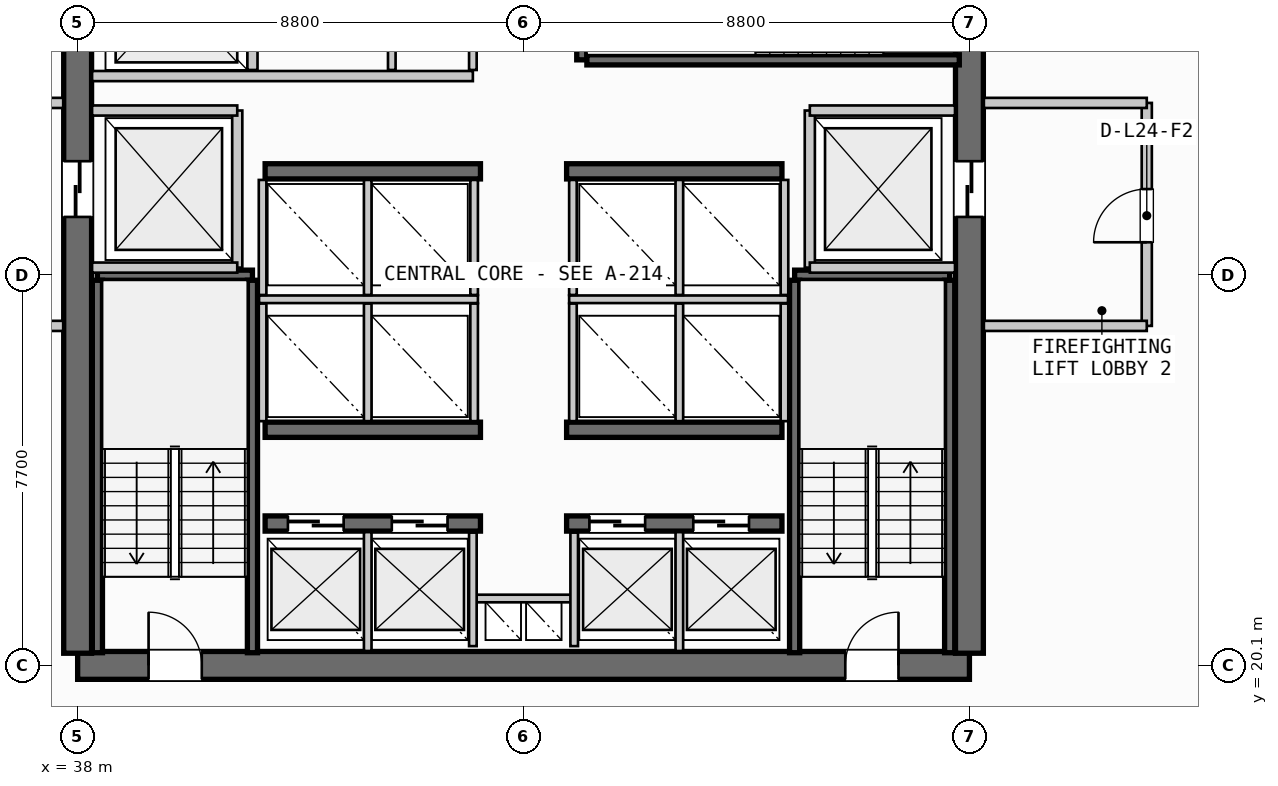
"""IFC4 building model, lengths in metres.
Left out: names, types, materials, properties, quantities, classifications, styles, units other than length and angle.
Written with IfcOpenShell. Run it as: python <this file> out.ifc"""

import sys

from ifc_helpers import new_model, si_unit, direction, frame, frame_2d, origin, place, context, subcontext, project, spatial, rectangle, extrude, source, transform, mapped, element, fill, save


model = new_model("IFC4")
c1 = context("Model", 3, precision=1e-05, world=origin(), true_north=direction((0.0, 1.0)))
c2 = subcontext(c1, "Body", "Model", "MODEL_VIEW")
j1 = project(units=[si_unit("LENGTHUNIT", "METRE"), si_unit("PLANEANGLEUNIT", "RADIAN")], contexts=[c1])
p1 = place(None, origin())
s1 = spatial("IfcSite", under=j1, at=p1, CompositionType="ELEMENT")
p2 = place(p1, origin())
s2 = spatial("IfcBuilding", under=s1, at=p2, CompositionType="ELEMENT")
p3 = place(p2, frame((0.0, 0.0, 100.0)))
s3 = spatial("IfcBuildingStorey", under=s2, at=p3, CompositionType="ELEMENT", Elevation=100.0)
p4 = place(p3, frame((38.0, 20.1, 0.0), z_axis=(0.0, 0.0, 1.0), x_axis=(1.0, 0.0, 0.0)))
e1 = element("IfcWall", 1, at=p4, inside=s3, PredefinedType="SHEAR", context=c2, shape_type="SweptSolid", body=[
    extrude(rectangle(XDim=17.6, YDim=0.55, at=frame_2d((8.8, 0.0))), origin(), (0.0, 0.0, 1.0), 3.35),
])
p5 = place(p4, frame((1.4, 0.0, 0.0)))
e2 = element("IfcOpeningElement", 2, at=p5, cuts=e1, PredefinedType="OPENING", context=c2, shape_type="SweptSolid", body=[
    extrude(rectangle(XDim=1.05, YDim=2.15, at=frame_2d((0.525, 1.075))), frame((0.0, 0.285, 0.0), z_axis=(0.0, -1.0, 0.0), x_axis=(1.0, 0.0, 0.0)), (0.0, 0.0, 1.0), 0.57),
])
p6 = place(p4, frame((15.15, 0.0, 0.0)))
e3 = element("IfcOpeningElement", 3, at=p6, cuts=e1, PredefinedType="OPENING", context=c2, shape_type="SweptSolid", body=[
    extrude(rectangle(XDim=1.05, YDim=2.15, at=frame_2d((0.525, 1.075))), frame((0.0, 0.285, 0.0), z_axis=(0.0, -1.0, 0.0), x_axis=(1.0, 0.0, 0.0)), (0.0, 0.0, 1.0), 0.57),
])
p7 = place(p3, frame((38.0, 35.26, 0.0), z_axis=(0.0, 0.0, 1.0), x_axis=(0.0, -1.0, 0.0)))
e4 = element("IfcWall", 4, at=p7, inside=s3, PredefinedType="SHEAR", context=c2, shape_type="SweptSolid", body=[
    extrude(rectangle(XDim=14.92, YDim=0.55, at=frame_2d((7.46, 0.0))), origin(), (0.0, 0.0, 1.0), 3.35),
])
p8 = place(p7, frame((5.21, 0.0, 0.0)))
e5 = element("IfcOpeningElement", 5, at=p8, cuts=e4, PredefinedType="OPENING", context=c2, shape_type="SweptSolid", body=[
    extrude(rectangle(XDim=1.1, YDim=2.2, at=frame_2d((0.55, 1.1))), frame((0.0, 0.285, 0.0), z_axis=(0.0, -1.0, 0.0), x_axis=(1.0, 0.0, 0.0)), (0.0, 0.0, 1.0), 0.57),
])
p9 = place(p3, frame((55.6, 20.34, 0.0), z_axis=(0.0, 0.0, 1.0), x_axis=(0.0, 1.0, 0.0)))
e6 = element("IfcWall", 6, at=p9, inside=s3, PredefinedType="SHEAR", context=c2, shape_type="SweptSolid", body=[
    extrude(rectangle(XDim=14.92, YDim=0.55, at=frame_2d((7.46, 0.0))), origin(), (0.0, 0.0, 1.0), 3.35),
])
p10 = place(p9, frame((12.71, 0.0, 0.0)))
e7 = element("IfcOpeningElement", 7, at=p10, cuts=e6, PredefinedType="OPENING", context=c2, shape_type="SweptSolid", body=[
    extrude(rectangle(XDim=1.05, YDim=2.15, at=frame_2d((0.525, 1.075))), frame((0.0, 0.285, 0.0), z_axis=(0.0, -1.0, 0.0), x_axis=(1.0, 0.0, 0.0)), (0.0, 0.0, 1.0), 0.57),
])
p11 = place(p9, frame((8.61, 0.0, 0.0)))
e8 = element("IfcOpeningElement", 8, at=p11, cuts=e6, PredefinedType="OPENING", context=c2, shape_type="SweptSolid", body=[
    extrude(rectangle(XDim=1.1, YDim=2.2, at=frame_2d((0.55, 1.1))), frame((0.0, 0.285, 0.0), z_axis=(0.0, -1.0, 0.0), x_axis=(1.0, 0.0, 0.0)), (0.0, 0.0, 1.0), 0.57),
])
p12 = place(p3, frame((41.7, 22.9, 0.0), z_axis=(0.0, 0.0, 1.0), x_axis=(1.0, 0.0, 0.0)))
e9 = element("IfcWall", 9, at=p12, inside=s3, PredefinedType="SHEAR", context=c2, shape_type="SweptSolid", body=[
    extrude(rectangle(XDim=4.25, YDim=0.3, at=frame_2d((2.125, 0.0))), origin(), (0.0, 0.0, 1.0), 3.35),
])
p13 = place(p12, frame((0.45, 0.0, 0.0)))
e10 = element("IfcOpeningElement", 10, at=p13, cuts=e9, PredefinedType="OPENING", context=c2, shape_type="SweptSolid", body=[
    extrude(rectangle(XDim=1.1, YDim=2.2, at=frame_2d((0.55, 1.1))), frame((0.0, 0.16, 0.0), z_axis=(0.0, -1.0, 0.0), x_axis=(1.0, 0.0, 0.0)), (0.0, 0.0, 1.0), 0.32),
])
p14 = place(p12, frame((2.5, 0.0, 0.0)))
e11 = element("IfcOpeningElement", 11, at=p14, cuts=e9, PredefinedType="OPENING", context=c2, shape_type="SweptSolid", body=[
    extrude(rectangle(XDim=1.1, YDim=2.2, at=frame_2d((0.55, 1.1))), frame((0.0, 0.16, 0.0), z_axis=(0.0, -1.0, 0.0), x_axis=(1.0, 0.0, 0.0)), (0.0, 0.0, 1.0), 0.32),
])
p15 = place(p3, frame((47.65, 22.9, 0.0), z_axis=(0.0, 0.0, 1.0), x_axis=(1.0, 0.0, 0.0)))
e12 = element("IfcWall", 12, at=p15, inside=s3, PredefinedType="SHEAR", context=c2, shape_type="SweptSolid", body=[
    extrude(rectangle(XDim=4.25, YDim=0.3, at=frame_2d((2.125, 0.0))), origin(), (0.0, 0.0, 1.0), 3.35),
])
p16 = place(p15, frame((0.45, 0.0, 0.0)))
e13 = element("IfcOpeningElement", 13, at=p16, cuts=e12, PredefinedType="OPENING", context=c2, shape_type="SweptSolid", body=[
    extrude(rectangle(XDim=1.1, YDim=2.2, at=frame_2d((0.55, 1.1))), frame((0.0, 0.16, 0.0), z_axis=(0.0, -1.0, 0.0), x_axis=(1.0, 0.0, 0.0)), (0.0, 0.0, 1.0), 0.32),
])
p17 = place(p15, frame((2.5, 0.0, 0.0)))
e14 = element("IfcOpeningElement", 14, at=p17, cuts=e12, PredefinedType="OPENING", context=c2, shape_type="SweptSolid", body=[
    extrude(rectangle(XDim=1.1, YDim=2.2, at=frame_2d((0.55, 1.1))), frame((0.0, 0.16, 0.0), z_axis=(0.0, -1.0, 0.0), x_axis=(1.0, 0.0, 0.0)), (0.0, 0.0, 1.0), 0.32),
])
for number, where, z_axis, x_axis in (
    (15, (41.7, 24.75, 0.0), (0.0, 0.0, 1.0), (1.0, 0.0, 0.0)),
    (16, (47.65, 24.75, 0.0), (0.0, 0.0, 1.0), (1.0, 0.0, 0.0)),
    (17, (41.7, 29.85, 0.0), (0.0, 0.0, 1.0), (1.0, 0.0, 0.0)),
    (18, (47.65, 29.85, 0.0), (0.0, 0.0, 1.0), (1.0, 0.0, 0.0)),
):
    element("IfcWall", number, at=place(p3, frame(where, z_axis=z_axis, x_axis=x_axis)), inside=s3, PredefinedType="SHEAR", context=c2, shape_type="SweptSolid", body=[
        extrude(rectangle(XDim=4.25, YDim=0.3, at=frame_2d((2.125, 0.0))), origin(), (0.0, 0.0, 1.0), 3.35),
    ])
p18 = place(p3, frame((38.39, 27.8, 0.0), z_axis=(0.0, 0.0, 1.0), x_axis=(1.0, 0.0, 0.0)))
e19 = element("IfcWall", 19, at=p18, inside=s3, PredefinedType="SHEAR", context=c2, shape_type="SweptSolid", body=[
    extrude(rectangle(XDim=3.06, YDim=0.2, at=frame_2d((1.53, 0.0))), origin(), (0.0, 0.0, 1.0), 3.35),
])
for number, where, z_axis, x_axis in (
    (20, (41.45, 27.7, 0.0), (0.0, 0.0, 1.0), (0.0, -1.0, 0.0)),
    (21, (38.39, 20.35, 0.0), (0.0, 0.0, 1.0), (0.0, 1.0, 0.0)),
):
    element("IfcWall", number, at=place(p3, frame(where, z_axis=z_axis, x_axis=x_axis)), inside=s3, PredefinedType="SHEAR", context=c2, shape_type="SweptSolid", body=[
        extrude(rectangle(XDim=7.35, YDim=0.2, at=frame_2d((3.675, 0.0))), origin(), (0.0, 0.0, 1.0), 3.35),
    ])
p19 = place(p3, frame((52.15, 27.8, 0.0), z_axis=(0.0, 0.0, 1.0), x_axis=(1.0, 0.0, 0.0)))
e22 = element("IfcWall", 22, at=p19, inside=s3, PredefinedType="SHEAR", context=c2, shape_type="SweptSolid", body=[
    extrude(rectangle(XDim=3.06, YDim=0.2, at=frame_2d((1.53, 0.0))), origin(), (0.0, 0.0, 1.0), 3.35),
])
for number, where, z_axis, x_axis in (
    (23, (55.21, 27.7, 0.0), (0.0, 0.0, 1.0), (0.0, -1.0, 0.0)),
    (24, (52.15, 20.35, 0.0), (0.0, 0.0, 1.0), (0.0, 1.0, 0.0)),
):
    element("IfcWall", number, at=place(p3, frame(where, z_axis=z_axis, x_axis=x_axis)), inside=s3, PredefinedType="SHEAR", context=c2, shape_type="SweptSolid", body=[
        extrude(rectangle(XDim=7.35, YDim=0.2, at=frame_2d((3.675, 0.0))), origin(), (0.0, 0.0, 1.0), 3.35),
    ])
p20 = place(p3, frame((47.95, 32.05, 0.0), z_axis=(0.0, 0.0, 1.0), x_axis=(0.0, 1.0, 0.0)))
e25 = element("IfcWall", 25, at=p20, inside=s3, PredefinedType="SHEAR", context=c2, shape_type="SweptSolid", body=[
    extrude(rectangle(XDim=3.06, YDim=0.2, at=frame_2d((1.53, 0.0))), origin(), (0.0, 0.0, 1.0), 3.35),
])
p21 = place(p3, frame((55.4, 32.05, 0.0), z_axis=(0.0, 0.0, 1.0), x_axis=(-1.0, 0.0, 0.0)))
e26 = element("IfcWall", 26, at=p21, inside=s3, PredefinedType="SHEAR", context=c2, shape_type="SweptSolid", body=[
    extrude(rectangle(XDim=7.35, YDim=0.2, at=frame_2d((3.675, 0.0))), origin(), (0.0, 0.0, 1.0), 3.35),
])
p22 = place(p3, frame((45.8, 21.42, 0.0), z_axis=(0.0, 0.0, 1.0), x_axis=(1.0, 0.0, 0.0)))
e27 = element("IfcWall", 27, at=p22, inside=s3, PredefinedType="PARTITIONING", context=c2, shape_type="SweptSolid", body=[
    extrude(rectangle(XDim=2.0, YDim=0.15, at=frame_2d((1.0, 0.0))), origin(), (0.0, 0.0, 1.0), 2.28),
])
for number, where, z_axis, x_axis in (
    (28, (45.8, 20.48, 0.0), (0.0, 0.0, 1.0), (0.0, 1.0, 0.0)),
    (29, (47.8, 20.48, 0.0), (0.0, 0.0, 1.0), (0.0, 1.0, 0.0)),
):
    element("IfcWall", number, at=place(p3, frame(where, z_axis=z_axis, x_axis=x_axis)), inside=s3, PredefinedType="PARTITIONING", context=c2, shape_type="SweptSolid", body=[
        extrude(rectangle(XDim=2.24, YDim=0.15, at=frame_2d((1.12, 0.0))), origin(), (0.0, 0.0, 1.0), 2.28),
    ])
p23 = place(p3, frame((41.15, 27.95, 0.0), z_axis=(0.0, 0.0, 1.0), x_axis=(0.0, 1.0, 0.0)))
e30 = element("IfcWall", 30, at=p23, inside=s3, PredefinedType="PARTITIONING", context=c2, shape_type="SweptSolid", body=[
    extrude(rectangle(XDim=3.1, YDim=0.2, at=frame_2d((1.55, 0.0))), origin(), (0.0, 0.0, 1.0), 2.28),
])
for number, where, z_axis, x_axis in (
    (31, (38.285, 27.95, 0.0), (0.0, 0.0, 1.0), (1.0, 0.0, 0.0)),
    (32, (38.285, 31.05, 0.0), (0.0, 0.0, 1.0), (1.0, 0.0, 0.0)),
):
    element("IfcWall", number, at=place(p3, frame(where, z_axis=z_axis, x_axis=x_axis)), inside=s3, PredefinedType="PARTITIONING", context=c2, shape_type="SweptSolid", body=[
        extrude(rectangle(XDim=2.865, YDim=0.2, at=frame_2d((1.433, 0.0))), origin(), (0.0, 0.0, 1.0), 2.28),
    ])
for number, where, z_axis, x_axis in (
    (33, (34.5, 26.8, 0.0), (0.0, 0.0, 1.0), (1.0, 0.0, 0.0)),
    (34, (34.5, 31.2, 0.0), (0.0, 0.0, 1.0), (1.0, 0.0, 0.0)),
):
    element("IfcWall", number, at=place(p3, frame(where, z_axis=z_axis, x_axis=x_axis)), inside=s3, PredefinedType="PARTITIONING", context=c2, shape_type="SweptSolid", body=[
        extrude(rectangle(XDim=3.215, YDim=0.2, at=frame_2d((1.607, 0.0))), origin(), (0.0, 0.0, 1.0), 2.28),
    ])
p24 = place(p3, frame((52.45, 27.95, 0.0), z_axis=(0.0, 0.0, 1.0), x_axis=(0.0, 1.0, 0.0)))
e35 = element("IfcWall", 35, at=p24, inside=s3, PredefinedType="PARTITIONING", context=c2, shape_type="SweptSolid", body=[
    extrude(rectangle(XDim=3.1, YDim=0.2, at=frame_2d((1.55, 0.0))), origin(), (0.0, 0.0, 1.0), 2.28),
])
for number, where, z_axis, x_axis in (
    (36, (52.45, 27.95, 0.0), (0.0, 0.0, 1.0), (1.0, 0.0, 0.0)),
    (37, (52.45, 31.05, 0.0), (0.0, 0.0, 1.0), (1.0, 0.0, 0.0)),
):
    element("IfcWall", number, at=place(p3, frame(where, z_axis=z_axis, x_axis=x_axis)), inside=s3, PredefinedType="PARTITIONING", context=c2, shape_type="SweptSolid", body=[
        extrude(rectangle(XDim=2.865, YDim=0.2, at=frame_2d((1.433, 0.0))), origin(), (0.0, 0.0, 1.0), 2.28),
    ])
p25 = place(p3, frame((59.1, 26.8, 0.0), z_axis=(0.0, 0.0, 1.0), x_axis=(0.0, 1.0, 0.0)))
e38 = element("IfcWall", 38, at=p25, inside=s3, PredefinedType="PARTITIONING", context=c2, shape_type="SweptSolid", body=[
    extrude(rectangle(XDim=4.4, YDim=0.2, at=frame_2d((2.2, 0.0))), origin(), (0.0, 0.0, 1.0), 2.28),
])
p26 = place(p25, frame((1.65, 0.0, 0.0)))
e39 = element("IfcOpeningElement", 39, at=p26, cuts=e38, PredefinedType="OPENING", context=c2, shape_type="SweptSolid", body=[
    extrude(rectangle(XDim=1.05, YDim=2.15, at=frame_2d((0.525, 1.075))), frame((0.0, 0.11, 0.0), z_axis=(0.0, -1.0, 0.0), x_axis=(1.0, 0.0, 0.0)), (0.0, 0.0, 1.0), 0.22),
])
for number, where, z_axis, x_axis in (
    (40, (55.885, 26.8, 0.0), (0.0, 0.0, 1.0), (1.0, 0.0, 0.0)),
    (41, (55.885, 31.2, 0.0), (0.0, 0.0, 1.0), (1.0, 0.0, 0.0)),
):
    element("IfcWall", number, at=place(p3, frame(where, z_axis=z_axis, x_axis=x_axis)), inside=s3, PredefinedType="PARTITIONING", context=c2, shape_type="SweptSolid", body=[
        extrude(rectangle(XDim=3.215, YDim=0.2, at=frame_2d((1.607, 0.0))), origin(), (0.0, 0.0, 1.0), 2.28),
    ])
for number, where, z_axis, x_axis in (
    (42, (43.725, 20.385, 0.0), (0.0, 0.0, 1.0), (0.0, 1.0, 0.0)),
    (43, (49.875, 20.385, 0.0), (0.0, 0.0, 1.0), (0.0, 1.0, 0.0)),
):
    element("IfcWall", number, at=place(p3, frame(where, z_axis=z_axis, x_axis=x_axis)), inside=s3, PredefinedType="PARTITIONING", context=c2, shape_type="SweptSolid", body=[
        extrude(rectangle(XDim=2.345, YDim=0.15, at=frame_2d((1.172, 0.0))), origin(), (0.0, 0.0, 1.0), 2.28),
    ])
p27 = place(p3, frame((41.58, 27.325, 0.0), z_axis=(0.0, 0.0, 1.0), x_axis=(1.0, 0.0, 0.0)))
e44 = element("IfcWall", 44, at=p27, inside=s3, PredefinedType="PARTITIONING", context=c2, shape_type="SweptSolid", body=[
    extrude(rectangle(XDim=4.32, YDim=0.15, at=frame_2d((2.16, 0.0))), origin(), (0.0, 0.0, 1.0), 2.28),
])
p28 = place(p3, frame((47.7, 27.325, 0.0), z_axis=(0.0, 0.0, 1.0), x_axis=(1.0, 0.0, 0.0)))
e45 = element("IfcWall", 45, at=p28, inside=s3, PredefinedType="PARTITIONING", context=c2, shape_type="SweptSolid", body=[
    extrude(rectangle(XDim=4.32, YDim=0.15, at=frame_2d((2.16, 0.0))), origin(), (0.0, 0.0, 1.0), 2.28),
])
for number, where, z_axis, x_axis in (
    (46, (41.65, 24.92, 0.0), (0.0, 0.0, 1.0), (0.0, 1.0, 0.0)),
    (47, (43.725, 24.92, 0.0), (0.0, 0.0, 1.0), (0.0, 1.0, 0.0)),
    (48, (45.825, 24.92, 0.0), (0.0, 0.0, 1.0), (0.0, 1.0, 0.0)),
    (49, (47.775, 24.92, 0.0), (0.0, 0.0, 1.0), (0.0, 1.0, 0.0)),
    (50, (49.875, 24.92, 0.0), (0.0, 0.0, 1.0), (0.0, 1.0, 0.0)),
    (51, (51.95, 24.92, 0.0), (0.0, 0.0, 1.0), (0.0, 1.0, 0.0)),
):
    element("IfcWall", number, at=place(p3, frame(where, z_axis=z_axis, x_axis=x_axis)), inside=s3, PredefinedType="PARTITIONING", context=c2, shape_type="SweptSolid", body=[
        extrude(rectangle(XDim=2.32, YDim=0.15, at=frame_2d((1.16, 0.0))), origin(), (0.0, 0.0, 1.0), 2.28),
    ])
for number, where, z_axis, x_axis in (
    (52, (41.65, 27.41, 0.0), (0.0, 0.0, 1.0), (0.0, 1.0, 0.0)),
    (53, (43.725, 27.41, 0.0), (0.0, 0.0, 1.0), (0.0, 1.0, 0.0)),
    (54, (45.825, 27.41, 0.0), (0.0, 0.0, 1.0), (0.0, 1.0, 0.0)),
    (55, (47.775, 27.41, 0.0), (0.0, 0.0, 1.0), (0.0, 1.0, 0.0)),
    (56, (49.875, 27.41, 0.0), (0.0, 0.0, 1.0), (0.0, 1.0, 0.0)),
    (57, (51.95, 27.41, 0.0), (0.0, 0.0, 1.0), (0.0, 1.0, 0.0)),
):
    element("IfcWall", number, at=place(p3, frame(where, z_axis=z_axis, x_axis=x_axis)), inside=s3, PredefinedType="PARTITIONING", context=c2, shape_type="SweptSolid", body=[
        extrude(rectangle(XDim=2.27, YDim=0.15, at=frame_2d((1.135, 0.0))), origin(), (0.0, 0.0, 1.0), 2.28),
    ])
p29 = place(p3, frame((41.45, 31.85, 0.0), z_axis=(0.0, 0.0, 1.0), x_axis=(0.0, 1.0, 0.0)))
e58 = element("IfcWall", 58, at=p29, inside=s3, PredefinedType="PARTITIONING", context=c2, shape_type="SweptSolid", body=[
    extrude(rectangle(XDim=3.365, YDim=0.2, at=frame_2d((1.683, 0.0))), origin(), (0.0, 0.0, 1.0), 2.28),
])
p30 = place(p3, frame((38.285, 31.73, 0.0), z_axis=(0.0, 0.0, 1.0), x_axis=(1.0, 0.0, 0.0)))
e59 = element("IfcWall", 59, at=p30, inside=s3, PredefinedType="PARTITIONING", context=c2, shape_type="SweptSolid", body=[
    extrude(rectangle(XDim=7.515, YDim=0.2, at=frame_2d((3.758, 0.0))), origin(), (0.0, 0.0, 1.0), 2.28),
])
p31 = place(p3, frame((45.8, 31.85, 0.0), z_axis=(0.0, 0.0, 1.0), x_axis=(0.0, 1.0, 0.0)))
e60 = element("IfcWall", 60, at=p31, inside=s3, PredefinedType="PARTITIONING", context=c2, shape_type="SweptSolid", body=[
    extrude(rectangle(XDim=3.365, YDim=0.15, at=frame_2d((1.683, 0.0))), origin(), (0.0, 0.0, 1.0), 2.28),
])
p32 = place(p3, frame((44.2, 31.85, 0.0), z_axis=(0.0, 0.0, 1.0), x_axis=(0.0, 1.0, 0.0)))
e61 = element("IfcWall", 61, at=p32, inside=s3, PredefinedType="PLUMBINGWALL", context=c2, shape_type="SweptSolid", body=[
    extrude(rectangle(XDim=3.365, YDim=0.15, at=frame_2d((1.683, 0.0))), origin(), (0.0, 0.0, 1.0), 2.28),
])
m1 = source(origin(), c2, "Body", "SweptSolid", [
    extrude(rectangle(XDim=1.05, YDim=2.15, at=frame_2d((0.525, 1.075))), frame((0.0, 0.025, 0.0), z_axis=(0.0, -1.0, 0.0), x_axis=(1.0, 0.0, 0.0)), (0.0, 0.0, 1.0), 0.05),
])
p33 = place(p5, origin())
e62 = element("IfcDoor", 62, at=p33, inside=s3, OperationType="SINGLE_SWING_LEFT", PredefinedType="DOOR", context=c2, shape_type="MappedRepresentation", body=[
    mapped(m1, transform((0.0, 0.0, 0.0), scale=1.0)),
])
fill(e2, e62)
p34 = place(p6, origin())
e63 = element("IfcDoor", 63, at=p34, inside=s3, OperationType="SINGLE_SWING_RIGHT", PredefinedType="DOOR", context=c2, shape_type="MappedRepresentation", body=[
    mapped(m1, transform((0.0, 0.0, 0.0), scale=1.0)),
])
fill(e3, e63)
m2 = source(origin(), c2, "Body", "SweptSolid", [
    extrude(rectangle(XDim=1.1, YDim=2.2, at=frame_2d((0.55, 1.1))), frame((0.0, 0.025, 0.0), z_axis=(0.0, -1.0, 0.0), x_axis=(1.0, 0.0, 0.0)), (0.0, 0.0, 1.0), 0.05),
])
p35 = place(p8, origin())
e64 = element("IfcDoor", 64, at=p35, inside=s3, OperationType="SLIDING_TO_LEFT", PredefinedType="DOOR", context=c2, shape_type="MappedRepresentation", body=[
    mapped(m2, transform((0.0, 0.0, 0.0), scale=1.0)),
])
fill(e5, e64)
p36 = place(p11, origin())
e65 = element("IfcDoor", 65, at=p36, inside=s3, OperationType="SLIDING_TO_RIGHT", PredefinedType="DOOR", context=c2, shape_type="MappedRepresentation", body=[
    mapped(m2, transform((0.0, 0.0, 0.0), scale=1.0)),
])
fill(e8, e65)
p37 = place(p13, origin())
e66 = element("IfcDoor", 66, at=p37, inside=s3, OperationType="SLIDING_TO_LEFT", PredefinedType="DOOR", context=c2, shape_type="MappedRepresentation", body=[
    mapped(m2, transform((0.0, 0.0, 0.0), scale=1.0)),
])
fill(e10, e66)
p38 = place(p14, origin())
e67 = element("IfcDoor", 67, at=p38, inside=s3, OperationType="SLIDING_TO_LEFT", PredefinedType="DOOR", context=c2, shape_type="MappedRepresentation", body=[
    mapped(m2, transform((0.0, 0.0, 0.0), scale=1.0)),
])
fill(e11, e67)
p39 = place(p16, origin())
e68 = element("IfcDoor", 68, at=p39, inside=s3, OperationType="SLIDING_TO_LEFT", PredefinedType="DOOR", context=c2, shape_type="MappedRepresentation", body=[
    mapped(m2, transform((0.0, 0.0, 0.0), scale=1.0)),
])
fill(e13, e68)
p40 = place(p17, origin())
e69 = element("IfcDoor", 69, at=p40, inside=s3, OperationType="SLIDING_TO_LEFT", PredefinedType="DOOR", context=c2, shape_type="MappedRepresentation", body=[
    mapped(m2, transform((0.0, 0.0, 0.0), scale=1.0)),
])
fill(e14, e69)
p41 = place(p26, origin())
e70 = element("IfcDoor", 70, at=p41, inside=s3, OperationType="SINGLE_SWING_LEFT", PredefinedType="DOOR", context=c2, shape_type="MappedRepresentation", body=[
    mapped(m1, transform((0.0, 0.0, 0.0), scale=1.0)),
])
fill(e39, e70)
save(model, sys.argv[1])
